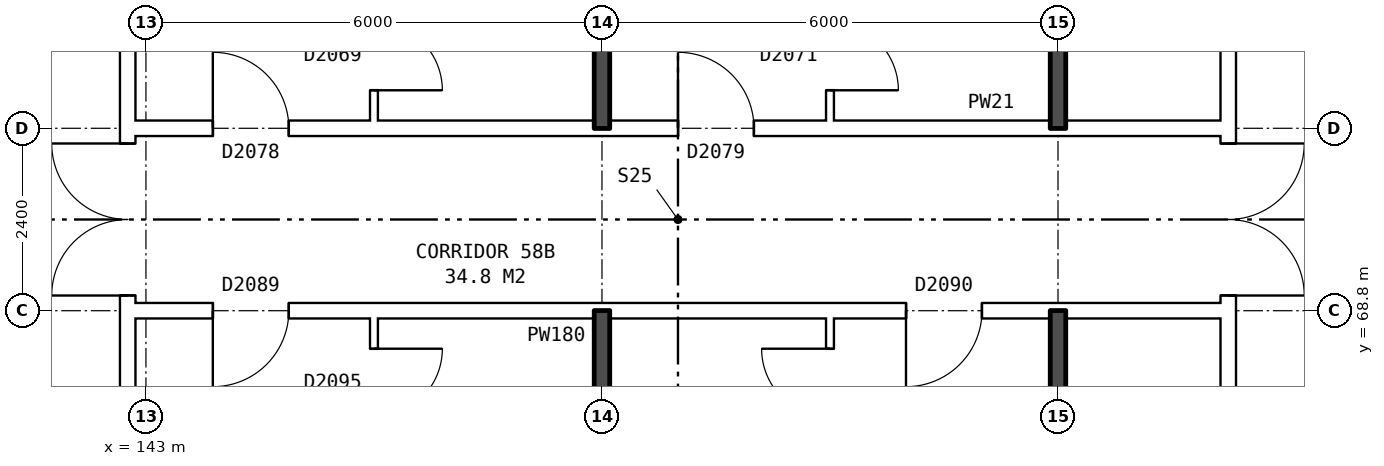
"""IFC4 building model, lengths in metres.
Left out: names, types, materials, properties, quantities, classifications, styles, units other than length and angle.
Written with IfcOpenShell. Run it as: python <this file> out.ifc"""

import sys

from ifc_helpers import new_model, si_unit, direction, frame, frame_2d, origin, place, context, subcontext, project, spatial, rectangle, extrude, element, fill, save


model = new_model("IFC4")
c1 = context("Model", 3, precision=1e-05, world=origin(), true_north=direction((0.0, 1.0)))
c2 = subcontext(c1, "Body", "Model", "MODEL_VIEW")
j1 = project(units=[si_unit("LENGTHUNIT", "METRE"), si_unit("PLANEANGLEUNIT", "RADIAN")], contexts=[c1])
p1 = place(None, origin())
s1 = spatial("IfcSite", under=j1, at=p1, CompositionType="ELEMENT")
p2 = place(p1, origin())
s2 = spatial("IfcBuilding", under=s1, at=p2, CompositionType="ELEMENT")
p3 = place(p2, frame((0.0, 0.0, 205.9)))
s3 = spatial("IfcBuildingStorey", under=s2, at=p3, CompositionType="ELEMENT", Elevation=205.9)
p4 = place(p3, frame((142.76, 63.9, 0.0), z_axis=(0.0, 0.0, 1.0), x_axis=(0.0, 1.0, 0.0)))
e1 = element("IfcWall", 1, at=p4, inside=s3, PredefinedType="PARTITIONING", context=c2, shape_type="SweptSolid", body=[
    extrude(rectangle(XDim=12.2, YDim=0.2, at=frame_2d((6.1, 0.0))), origin(), (0.0, 0.0, 1.0), 2.85),
])
p5 = place(p4, frame((5.1, 0.0, 0.0)))
e2 = element("IfcOpeningElement", 2, at=p5, cuts=e1, PredefinedType="OPENING", context=c2, shape_type="SweptSolid", body=[
    extrude(rectangle(XDim=2.0, YDim=2.1, at=frame_2d((1.0, 1.05))), frame((0.0, 0.11, 0.0), z_axis=(0.0, -1.0, 0.0), x_axis=(1.0, 0.0, 0.0)), (0.0, 0.0, 1.0), 0.22),
])
p6 = place(p3, frame((157.24, 63.9, 0.0), z_axis=(0.0, 0.0, 1.0), x_axis=(0.0, 1.0, 0.0)))
e3 = element("IfcWall", 3, at=p6, inside=s3, PredefinedType="PARTITIONING", context=c2, shape_type="SweptSolid", body=[
    extrude(rectangle(XDim=12.2, YDim=0.2, at=frame_2d((6.1, 0.0))), origin(), (0.0, 0.0, 1.0), 2.85),
])
p7 = place(p6, frame((5.1, 0.0, 0.0)))
e4 = element("IfcOpeningElement", 4, at=p7, cuts=e3, PredefinedType="OPENING", context=c2, shape_type="SweptSolid", body=[
    extrude(rectangle(XDim=2.0, YDim=2.1, at=frame_2d((1.0, 1.05))), frame((0.0, 0.11, 0.0), z_axis=(0.0, -1.0, 0.0), x_axis=(1.0, 0.0, 0.0)), (0.0, 0.0, 1.0), 0.22),
])
p8 = place(p3, frame((142.76, 68.8, 0.0), z_axis=(0.0, 0.0, 1.0), x_axis=(1.0, 0.0, 0.0)))
e5 = element("IfcWall", 5, at=p8, inside=s3, PredefinedType="PARTITIONING", context=c2, shape_type="SweptSolid", body=[
    extrude(rectangle(XDim=14.48, YDim=0.2, at=frame_2d((7.24, 0.0))), origin(), (0.0, 0.0, 1.0), 2.85),
])
p9 = place(p8, frame((1.12, 0.0, 0.0)))
e6 = element("IfcOpeningElement", 6, at=p9, cuts=e5, PredefinedType="OPENING", context=c2, shape_type="SweptSolid", body=[
    extrude(rectangle(XDim=1.0, YDim=2.1, at=frame_2d((0.5, 1.05))), frame((0.0, 0.11, 0.0), z_axis=(0.0, -1.0, 0.0), x_axis=(1.0, 0.0, 0.0)), (0.0, 0.0, 1.0), 0.22),
])
p10 = place(p8, frame((10.24, 0.0, 0.0)))
e7 = element("IfcOpeningElement", 7, at=p10, cuts=e5, PredefinedType="OPENING", context=c2, shape_type="SweptSolid", body=[
    extrude(rectangle(XDim=1.0, YDim=2.1, at=frame_2d((0.5, 1.05))), frame((0.0, 0.11, 0.0), z_axis=(0.0, -1.0, 0.0), x_axis=(1.0, 0.0, 0.0)), (0.0, 0.0, 1.0), 0.22),
])
p11 = place(p3, frame((142.76, 71.2, 0.0), z_axis=(0.0, 0.0, 1.0), x_axis=(1.0, 0.0, 0.0)))
e8 = element("IfcWall", 8, at=p11, inside=s3, PredefinedType="PARTITIONING", context=c2, shape_type="SweptSolid", body=[
    extrude(rectangle(XDim=14.48, YDim=0.2, at=frame_2d((7.24, 0.0))), origin(), (0.0, 0.0, 1.0), 2.85),
])
p12 = place(p11, frame((1.12, 0.0, 0.0)))
e9 = element("IfcOpeningElement", 9, at=p12, cuts=e8, PredefinedType="OPENING", context=c2, shape_type="SweptSolid", body=[
    extrude(rectangle(XDim=1.0, YDim=2.1, at=frame_2d((0.5, 1.05))), frame((0.0, 0.11, 0.0), z_axis=(0.0, -1.0, 0.0), x_axis=(1.0, 0.0, 0.0)), (0.0, 0.0, 1.0), 0.22),
])
p13 = place(p11, frame((7.24, 0.0, 0.0)))
e10 = element("IfcOpeningElement", 10, at=p13, cuts=e8, PredefinedType="OPENING", context=c2, shape_type="SweptSolid", body=[
    extrude(rectangle(XDim=1.0, YDim=2.1, at=frame_2d((0.5, 1.05))), frame((0.0, 0.11, 0.0), z_axis=(0.0, -1.0, 0.0), x_axis=(1.0, 0.0, 0.0)), (0.0, 0.0, 1.0), 0.22),
])
p14 = place(p3, frame((146.0, 54.36, 0.0), z_axis=(0.0, 0.0, 1.0), x_axis=(0.0, 1.0, 0.0)))
e11 = element("IfcWall", 11, at=p14, inside=s3, PredefinedType="PARTITIONING", context=c2, shape_type="SweptSolid", body=[
    extrude(rectangle(XDim=14.34, YDim=0.1, at=frame_2d((7.17, 0.0))), origin(), (0.0, 0.0, 1.0), 2.85),
])
p15 = place(p14, frame((5.5, 0.0, 0.0)))
e12 = element("IfcOpeningElement", 12, at=p15, cuts=e11, PredefinedType="OPENING", context=c2, shape_type="SweptSolid", body=[
    extrude(rectangle(XDim=0.9, YDim=2.1, at=frame_2d((0.45, 1.05))), frame((0.0, 0.06, 0.0), z_axis=(0.0, -1.0, 0.0), x_axis=(1.0, 0.0, 0.0)), (0.0, 0.0, 1.0), 0.12),
])
p16 = place(p14, frame((13.04, 0.0, 0.0)))
e13 = element("IfcOpeningElement", 13, at=p16, cuts=e11, PredefinedType="OPENING", context=c2, shape_type="SweptSolid", body=[
    extrude(rectangle(XDim=0.9, YDim=2.1, at=frame_2d((0.45, 1.05))), frame((0.0, 0.06, 0.0), z_axis=(0.0, -1.0, 0.0), x_axis=(1.0, 0.0, 0.0)), (0.0, 0.0, 1.0), 0.12),
])
p17 = place(p3, frame((146.0, 71.3, 0.0), z_axis=(0.0, 0.0, 1.0), x_axis=(0.0, 1.0, 0.0)))
e14 = element("IfcWall", 14, at=p17, inside=s3, PredefinedType="PARTITIONING", context=c2, shape_type="SweptSolid", body=[
    extrude(rectangle(XDim=14.34, YDim=0.1, at=frame_2d((7.17, 0.0))), origin(), (0.0, 0.0, 1.0), 2.85),
])
p18 = place(p17, frame((5.74, 0.0, 0.0)))
e15 = element("IfcOpeningElement", 15, at=p18, cuts=e14, PredefinedType="OPENING", context=c2, shape_type="SweptSolid", body=[
    extrude(rectangle(XDim=0.9, YDim=2.1, at=frame_2d((0.45, 1.05))), frame((0.0, 0.06, 0.0), z_axis=(0.0, -1.0, 0.0), x_axis=(1.0, 0.0, 0.0)), (0.0, 0.0, 1.0), 0.12),
])
p19 = place(p17, frame((0.4, 0.0, 0.0)))
e16 = element("IfcOpeningElement", 16, at=p19, cuts=e14, PredefinedType="OPENING", context=c2, shape_type="SweptSolid", body=[
    extrude(rectangle(XDim=0.9, YDim=2.1, at=frame_2d((0.45, 1.05))), frame((0.0, 0.06, 0.0), z_axis=(0.0, -1.0, 0.0), x_axis=(1.0, 0.0, 0.0)), (0.0, 0.0, 1.0), 0.12),
])
for number, where, z_axis, x_axis in (
    (17, (149.0, 54.36, 0.0), (0.0, 0.0, 1.0), (0.0, 1.0, 0.0)),
    (18, (149.0, 71.2, 0.0), (0.0, 0.0, 1.0), (0.0, 1.0, 0.0)),
):
    element("IfcWall", number, at=place(p3, frame(where, z_axis=z_axis, x_axis=x_axis)), inside=s3, PredefinedType="SOLIDWALL", context=c2, shape_type="SweptSolid", body=[
        extrude(rectangle(XDim=14.44, YDim=0.2, at=frame_2d((7.22, 0.0))), origin(), (0.0, 0.0, 1.0), 2.85),
    ])
p20 = place(p3, frame((152.0, 54.36, 0.0), z_axis=(0.0, 0.0, 1.0), x_axis=(0.0, 1.0, 0.0)))
e19 = element("IfcWall", 19, at=p20, inside=s3, PredefinedType="PARTITIONING", context=c2, shape_type="SweptSolid", body=[
    extrude(rectangle(XDim=14.34, YDim=0.1, at=frame_2d((7.17, 0.0))), origin(), (0.0, 0.0, 1.0), 2.85),
])
p21 = place(p20, frame((4.2, 0.0, 0.0)))
e20 = element("IfcOpeningElement", 20, at=p21, cuts=e19, PredefinedType="OPENING", context=c2, shape_type="SweptSolid", body=[
    extrude(rectangle(XDim=0.9, YDim=2.1, at=frame_2d((0.45, 1.05))), frame((0.0, 0.06, 0.0), z_axis=(0.0, -1.0, 0.0), x_axis=(1.0, 0.0, 0.0)), (0.0, 0.0, 1.0), 0.12),
])
p22 = place(p20, frame((13.04, 0.0, 0.0)))
e21 = element("IfcOpeningElement", 21, at=p22, cuts=e19, PredefinedType="OPENING", context=c2, shape_type="SweptSolid", body=[
    extrude(rectangle(XDim=0.9, YDim=2.1, at=frame_2d((0.45, 1.05))), frame((0.0, 0.06, 0.0), z_axis=(0.0, -1.0, 0.0), x_axis=(1.0, 0.0, 0.0)), (0.0, 0.0, 1.0), 0.12),
])
p23 = place(p3, frame((152.0, 71.3, 0.0), z_axis=(0.0, 0.0, 1.0), x_axis=(0.0, 1.0, 0.0)))
e22 = element("IfcWall", 22, at=p23, inside=s3, PredefinedType="PARTITIONING", context=c2, shape_type="SweptSolid", body=[
    extrude(rectangle(XDim=14.34, YDim=0.1, at=frame_2d((7.17, 0.0))), origin(), (0.0, 0.0, 1.0), 2.85),
])
p24 = place(p23, frame((7.94, 0.0, 0.0)))
e23 = element("IfcOpeningElement", 23, at=p24, cuts=e22, PredefinedType="OPENING", context=c2, shape_type="SweptSolid", body=[
    extrude(rectangle(XDim=0.9, YDim=2.1, at=frame_2d((0.45, 1.05))), frame((0.0, 0.06, 0.0), z_axis=(0.0, -1.0, 0.0), x_axis=(1.0, 0.0, 0.0)), (0.0, 0.0, 1.0), 0.12),
])
p25 = place(p23, frame((0.4, 0.0, 0.0)))
e24 = element("IfcOpeningElement", 24, at=p25, cuts=e22, PredefinedType="OPENING", context=c2, shape_type="SweptSolid", body=[
    extrude(rectangle(XDim=0.9, YDim=2.1, at=frame_2d((0.45, 1.05))), frame((0.0, 0.06, 0.0), z_axis=(0.0, -1.0, 0.0), x_axis=(1.0, 0.0, 0.0)), (0.0, 0.0, 1.0), 0.12),
])
for number, where, z_axis, x_axis in (
    (25, (155.0, 54.36, 0.0), (0.0, 0.0, 1.0), (0.0, 1.0, 0.0)),
    (26, (155.0, 71.2, 0.0), (0.0, 0.0, 1.0), (0.0, 1.0, 0.0)),
):
    element("IfcWall", number, at=place(p3, frame(where, z_axis=z_axis, x_axis=x_axis)), inside=s3, PredefinedType="SOLIDWALL", context=c2, shape_type="SweptSolid", body=[
        extrude(rectangle(XDim=14.44, YDim=0.2, at=frame_2d((7.22, 0.0))), origin(), (0.0, 0.0, 1.0), 2.85),
    ])
p26 = place(p5, origin())
e27 = element("IfcDoor", 27, at=p26, inside=s3, OperationType="DOUBLE_DOOR_SINGLE_SWING", PredefinedType="DOOR", context=c2, shape_type="SweptSolid", body=[
    extrude(rectangle(XDim=2.0, YDim=2.1, at=frame_2d((1.0, 1.05))), frame((0.0, 0.025, 0.0), z_axis=(0.0, -1.0, 0.0), x_axis=(1.0, 0.0, 0.0)), (0.0, 0.0, 1.0), 0.05),
])
fill(e2, e27)
p27 = place(p7, frame((2.0, 0.0, 0.0), z_axis=(0.0, 0.0, 1.0), x_axis=(-1.0, 0.0, 0.0)))
e28 = element("IfcDoor", 28, at=p27, inside=s3, OperationType="DOUBLE_DOOR_SINGLE_SWING", PredefinedType="DOOR", context=c2, shape_type="SweptSolid", body=[
    extrude(rectangle(XDim=2.0, YDim=2.1, at=frame_2d((1.0, 1.05))), frame((0.0, 0.025, 0.0), z_axis=(0.0, -1.0, 0.0), x_axis=(1.0, 0.0, 0.0)), (0.0, 0.0, 1.0), 0.05),
])
fill(e4, e28)
p28 = place(p9, frame((1.0, 0.0, 0.0), z_axis=(0.0, 0.0, 1.0), x_axis=(-1.0, 0.0, 0.0)))
e29 = element("IfcDoor", 29, at=p28, inside=s3, OperationType="SINGLE_SWING_RIGHT", PredefinedType="DOOR", context=c2, shape_type="SweptSolid", body=[
    extrude(rectangle(XDim=1.0, YDim=2.1, at=frame_2d((0.5, 1.05))), frame((0.0, 0.025, 0.0), z_axis=(0.0, -1.0, 0.0), x_axis=(1.0, 0.0, 0.0)), (0.0, 0.0, 1.0), 0.05),
])
fill(e6, e29)
p29 = place(p16, frame((0.9, 0.0, 0.0), z_axis=(0.0, 0.0, 1.0), x_axis=(-1.0, 0.0, 0.0)))
e30 = element("IfcDoor", 30, at=p29, inside=s3, OperationType="SINGLE_SWING_LEFT", PredefinedType="DOOR", context=c2, shape_type="SweptSolid", body=[
    extrude(rectangle(XDim=0.9, YDim=2.1, at=frame_2d((0.45, 1.05))), frame((0.0, 0.025, 0.0), z_axis=(0.0, -1.0, 0.0), x_axis=(1.0, 0.0, 0.0)), (0.0, 0.0, 1.0), 0.05),
])
fill(e13, e30)
p30 = place(p10, frame((1.0, 0.0, 0.0), z_axis=(0.0, 0.0, 1.0), x_axis=(-1.0, 0.0, 0.0)))
e31 = element("IfcDoor", 31, at=p30, inside=s3, OperationType="SINGLE_SWING_RIGHT", PredefinedType="DOOR", context=c2, shape_type="SweptSolid", body=[
    extrude(rectangle(XDim=1.0, YDim=2.1, at=frame_2d((0.5, 1.05))), frame((0.0, 0.025, 0.0), z_axis=(0.0, -1.0, 0.0), x_axis=(1.0, 0.0, 0.0)), (0.0, 0.0, 1.0), 0.05),
])
fill(e7, e31)
p31 = place(p22, origin())
e32 = element("IfcDoor", 32, at=p31, inside=s3, OperationType="SINGLE_SWING_RIGHT", PredefinedType="DOOR", context=c2, shape_type="SweptSolid", body=[
    extrude(rectangle(XDim=0.9, YDim=2.1, at=frame_2d((0.45, 1.05))), frame((0.0, 0.025, 0.0), z_axis=(0.0, -1.0, 0.0), x_axis=(1.0, 0.0, 0.0)), (0.0, 0.0, 1.0), 0.05),
])
fill(e21, e32)
p32 = place(p12, origin())
e33 = element("IfcDoor", 33, at=p32, inside=s3, OperationType="SINGLE_SWING_LEFT", PredefinedType="DOOR", context=c2, shape_type="SweptSolid", body=[
    extrude(rectangle(XDim=1.0, YDim=2.1, at=frame_2d((0.5, 1.05))), frame((0.0, 0.025, 0.0), z_axis=(0.0, -1.0, 0.0), x_axis=(1.0, 0.0, 0.0)), (0.0, 0.0, 1.0), 0.05),
])
fill(e9, e33)
p33 = place(p19, frame((0.9, 0.0, 0.0), z_axis=(0.0, 0.0, 1.0), x_axis=(-1.0, 0.0, 0.0)))
e34 = element("IfcDoor", 34, at=p33, inside=s3, OperationType="SINGLE_SWING_RIGHT", PredefinedType="DOOR", context=c2, shape_type="SweptSolid", body=[
    extrude(rectangle(XDim=0.9, YDim=2.1, at=frame_2d((0.45, 1.05))), frame((0.0, 0.025, 0.0), z_axis=(0.0, -1.0, 0.0), x_axis=(1.0, 0.0, 0.0)), (0.0, 0.0, 1.0), 0.05),
])
fill(e16, e34)
p34 = place(p13, origin())
e35 = element("IfcDoor", 35, at=p34, inside=s3, OperationType="SINGLE_SWING_LEFT", PredefinedType="DOOR", context=c2, shape_type="SweptSolid", body=[
    extrude(rectangle(XDim=1.0, YDim=2.1, at=frame_2d((0.5, 1.05))), frame((0.0, 0.025, 0.0), z_axis=(0.0, -1.0, 0.0), x_axis=(1.0, 0.0, 0.0)), (0.0, 0.0, 1.0), 0.05),
])
fill(e10, e35)
p35 = place(p25, frame((0.9, 0.0, 0.0), z_axis=(0.0, 0.0, 1.0), x_axis=(-1.0, 0.0, 0.0)))
e36 = element("IfcDoor", 36, at=p35, inside=s3, OperationType="SINGLE_SWING_RIGHT", PredefinedType="DOOR", context=c2, shape_type="SweptSolid", body=[
    extrude(rectangle(XDim=0.9, YDim=2.1, at=frame_2d((0.45, 1.05))), frame((0.0, 0.025, 0.0), z_axis=(0.0, -1.0, 0.0), x_axis=(1.0, 0.0, 0.0)), (0.0, 0.0, 1.0), 0.05),
])
fill(e24, e36)
save(model, sys.argv[1])
